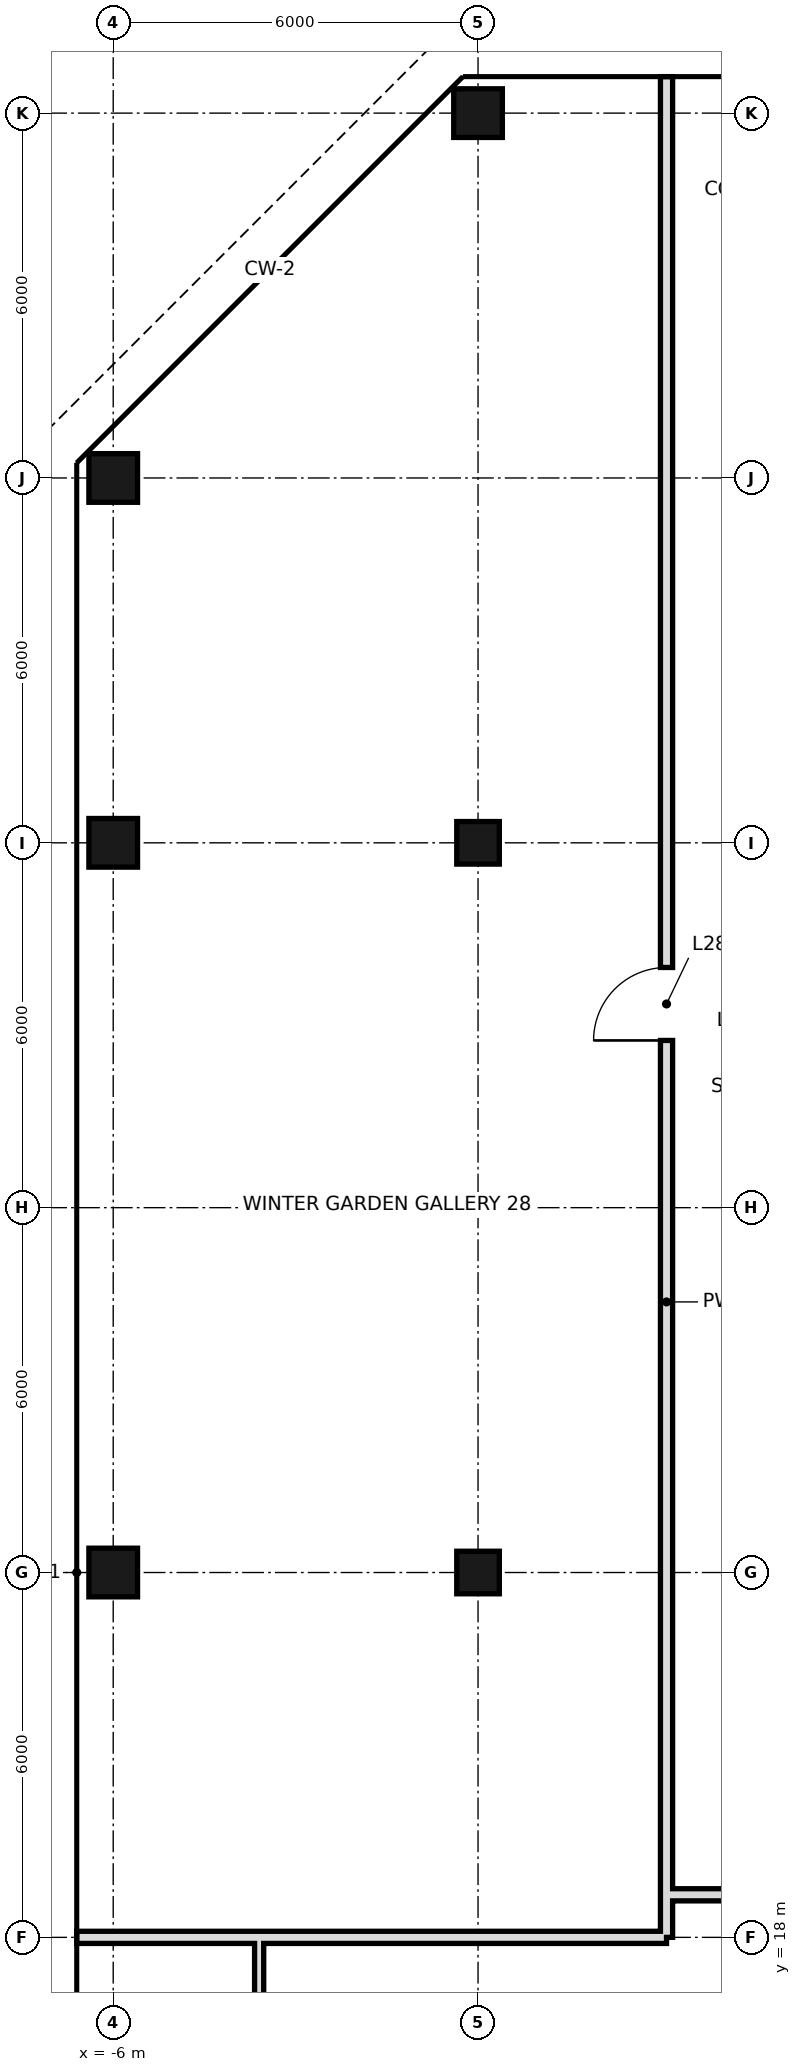
"""IFC4 building model, lengths in metres.
Left out: names, types, materials, properties, quantities, classifications, styles, units other than length and angle.
Written with IfcOpenShell. Run it as: python <this file> out.ifc"""

import sys

from ifc_helpers import new_model, si_unit, direction, frame, frame_2d, origin, origin_2d, place, context, subcontext, project, spatial, rectangle, hollow_rectangle, extrude, element, fill, save


model = new_model("IFC4")
c1 = context("Model", 3, precision=1e-05, world=origin(), true_north=direction((0.0, 1.0)))
c2 = subcontext(c1, "Body", "Model", "MODEL_VIEW")
j1 = project(units=[si_unit("LENGTHUNIT", "METRE"), si_unit("PLANEANGLEUNIT", "RADIAN")], contexts=[c1])
p1 = place(None, origin())
s1 = spatial("IfcSite", under=j1, at=p1, CompositionType="ELEMENT")
p2 = place(p1, origin())
s2 = spatial("IfcBuilding", under=s1, at=p2, CompositionType="ELEMENT")
p3 = place(p2, frame((0.0, 0.0, 126.8)))
s3 = spatial("IfcBuildingStorey", under=s2, at=p3, CompositionType="ELEMENT", Elevation=126.8)
for number, where, z_axis, x_axis in (
    (1, (-6.0, 24.0, 0.0), (0.0, 0.0, 1.0), (1.0, 0.0, 0.0)),
    (2, (-6.0, 36.0, 0.0), (0.0, 0.0, 1.0), (1.0, 0.0, 0.0)),
    (3, (-6.0, 42.0, 0.0), (0.0, 0.0, 1.0), (1.0, 0.0, 0.0)),
):
    element("IfcColumn", number, at=place(p3, frame(where, z_axis=z_axis, x_axis=x_axis)), inside=s3, PredefinedType="COLUMN", context=c2, shape_type="SweptSolid", body=[
        extrude(hollow_rectangle(XDim=0.8, YDim=0.8, WallThickness=0.04, at=origin_2d()), origin(), (0.0, 0.0, 1.0), 3.6),
    ])
for number, where, z_axis, x_axis in (
    (4, (0.0, 24.0, 0.0), (0.0, 0.0, 1.0), (1.0, 0.0, 0.0)),
    (5, (0.0, 36.0, 0.0), (0.0, 0.0, 1.0), (1.0, 0.0, 0.0)),
):
    element("IfcColumn", number, at=place(p3, frame(where, z_axis=z_axis, x_axis=x_axis)), inside=s3, PredefinedType="COLUMN", context=c2, shape_type="SweptSolid", body=[
        extrude(hollow_rectangle(XDim=0.7, YDim=0.7, WallThickness=0.036, at=origin_2d()), origin(), (0.0, 0.0, 1.0), 3.6),
    ])
p4 = place(p3, frame((0.0, 48.0, 0.0), z_axis=(0.0, 0.0, 1.0), x_axis=(1.0, 0.0, 0.0)))
e6 = element("IfcColumn", 6, at=p4, inside=s3, PredefinedType="COLUMN", context=c2, shape_type="SweptSolid", body=[
    extrude(hollow_rectangle(XDim=0.8, YDim=0.8, WallThickness=0.04, at=origin_2d()), origin(), (0.0, 0.0, 1.0), 3.6),
])
p5 = place(p3, frame((-3.6, 10.8, 0.0), z_axis=(0.0, 0.0, 1.0), x_axis=(0.0, 1.0, 0.0)))
e7 = element("IfcWall", 7, at=p5, inside=s3, PredefinedType="PARTITIONING", context=c2, shape_type="SweptSolid", body=[
    extrude(rectangle(XDim=7.2, YDim=0.15, at=frame_2d((3.6, 0.0))), origin(), (0.0, 0.0, 1.0), 3.42),
])
p6 = place(p3, frame((3.1, 18.0, 0.0), z_axis=(0.0, 0.0, 1.0), x_axis=(0.0, 1.0, 0.0)))
e8 = element("IfcWall", 8, at=p6, inside=s3, PredefinedType="SOLIDWALL", context=c2, shape_type="SweptSolid", body=[
    extrude(rectangle(XDim=30.6, YDim=0.2, at=frame_2d((15.3, 0.0))), origin(), (0.0, 0.0, 1.0), 2.72),
])
p7 = place(p6, frame((14.75, 0.0, 0.0)))
e9 = element("IfcOpeningElement", 9, at=p7, cuts=e8, PredefinedType="OPENING", context=c2, shape_type="SweptSolid", body=[
    extrude(rectangle(XDim=1.2, YDim=2.4, at=frame_2d((0.6, 1.2))), frame((0.0, 0.11, 0.0), z_axis=(0.0, -1.0, 0.0), x_axis=(1.0, 0.0, 0.0)), (0.0, 0.0, 1.0), 0.22),
])
p8 = place(p3, frame((-6.6, 18.0, 0.0), z_axis=(0.0, 0.0, 1.0), x_axis=(1.0, 0.0, 0.0)))
e10 = element("IfcWall", 10, at=p8, inside=s3, PredefinedType="SOLIDWALL", context=c2, shape_type="SweptSolid", body=[
    extrude(rectangle(XDim=9.7, YDim=0.2, at=frame_2d((4.85, 0.0))), origin(), (0.0, 0.0, 1.0), 2.72),
])
p9 = place(p3, frame((3.1, 18.7, 0.0), z_axis=(0.0, 0.0, 1.0), x_axis=(1.0, 0.0, 0.0)))
e11 = element("IfcWall", 11, at=p9, inside=s3, PredefinedType="SOLIDWALL", context=c2, shape_type="SweptSolid", body=[
    extrude(rectangle(XDim=15.5, YDim=0.2, at=frame_2d((7.75, 0.0))), origin(), (0.0, 0.0, 1.0), 2.72),
])
p10 = place(p9, frame((11.04, 0.0, 0.0)))
e12 = element("IfcOpeningElement", 12, at=p10, cuts=e11, PredefinedType="OPENING", context=c2, shape_type="SweptSolid", body=[
    extrude(rectangle(XDim=1.2, YDim=2.4, at=frame_2d((0.6, 1.2))), frame((0.0, 0.11, 0.0), z_axis=(0.0, -1.0, 0.0), x_axis=(1.0, 0.0, 0.0)), (0.0, 0.0, 1.0), 0.22),
])
p11 = place(p7, origin())
e13 = element("IfcDoor", 13, at=p11, inside=s3, OperationType="SINGLE_SWING_LEFT", PredefinedType="DOOR", context=c2, shape_type="SweptSolid", body=[
    extrude(rectangle(XDim=1.2, YDim=2.4, at=frame_2d((0.6, 1.2))), frame((0.0, 0.025, 0.0), z_axis=(0.0, -1.0, 0.0), x_axis=(1.0, 0.0, 0.0)), (0.0, 0.0, 1.0), 0.05),
])
fill(e9, e13)
save(model, sys.argv[1])
